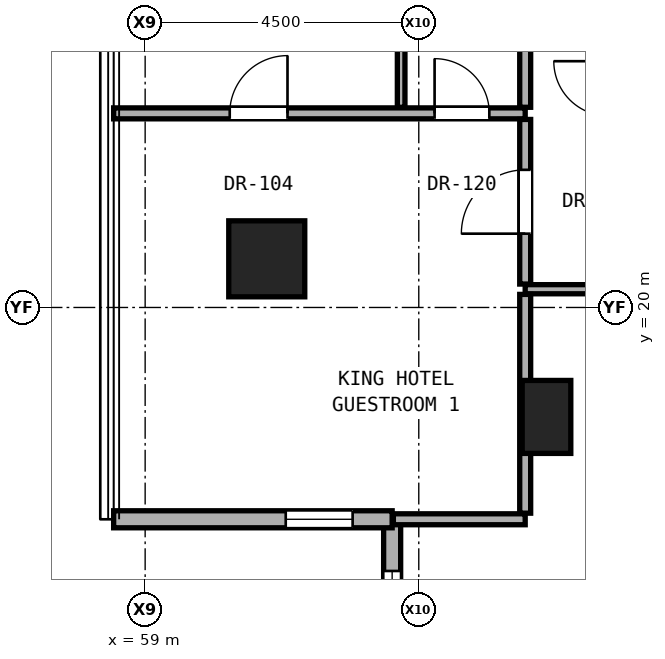
"""IFC4 building model, lengths in metres.
Left out: names, types, materials, properties, quantities, classifications, styles, units other than length and angle.
Written with IfcOpenShell. Run it as: python <this file> out.ifc"""

import sys

from ifc_helpers import new_model, si_unit, direction, frame, frame_2d, origin, origin_2d, place, context, subcontext, project, spatial, rectangle, hollow_rectangle, extrude, element, fill, save


model = new_model("IFC4")
c1 = context("Model", 3, precision=1e-05, world=origin(), true_north=direction((0.0, 1.0)))
c2 = subcontext(c1, "Body", "Model", "MODEL_VIEW")
j1 = project(units=[si_unit("LENGTHUNIT", "METRE"), si_unit("PLANEANGLEUNIT", "RADIAN")], contexts=[c1])
p1 = place(None, origin())
s1 = spatial("IfcSite", under=j1, at=p1, CompositionType="ELEMENT")
p2 = place(p1, origin())
s2 = spatial("IfcBuilding", under=s1, at=p2, CompositionType="ELEMENT")
p3 = place(p2, frame((0.0, 0.0, 25.7)))
s3 = spatial("IfcBuildingStorey", under=s2, at=p3, CompositionType="ELEMENT", Elevation=25.7)
p4 = place(p3, frame((61.0, 20.8, 0.0), z_axis=(0.0, 0.0, 1.0), x_axis=(1.0, 0.0, 0.0)))
e1 = element("IfcColumn", 1, at=p4, inside=s3, PredefinedType="COLUMN", context=c2, shape_type="SweptSolid", body=[
    extrude(hollow_rectangle(XDim=1.25, YDim=1.25, WallThickness=0.07, at=origin_2d()), origin(), (0.0, 0.0, 1.0), 3.3),
])
p5 = place(p3, frame((65.6, 18.2, 0.0), z_axis=(0.0, 0.0, 1.0), x_axis=(1.0, 0.0, 0.0)))
e2 = element("IfcColumn", 2, at=p5, inside=s3, PredefinedType="PILASTER", context=c2, shape_type="SweptSolid", body=[
    extrude(rectangle(XDim=0.8, YDim=1.2, at=origin_2d()), origin(), (0.0, 0.0, 1.0), 3.3),
])
p6 = place(p3, frame((63.062, 16.517, 0.0), z_axis=(0.0, 0.0, 1.0), x_axis=(0.0, -1.0, 0.0)))
e3 = element("IfcWall", 3, at=p6, inside=s3, PredefinedType="SOLIDWALL", context=c2, shape_type="SweptSolid", body=[
    extrude(rectangle(XDim=4.58, YDim=0.28, at=frame_2d((2.29, 0.0))), origin(), (0.0, 0.0, 1.0), 3.04),
])
p7 = place(p6, frame((0.85, 0.0, 0.79)))
e4 = element("IfcOpeningElement", 4, at=p7, cuts=e3, PredefinedType="OPENING", context=c2, shape_type="SweptSolid", body=[
    extrude(rectangle(XDim=1.8, YDim=2.1, at=frame_2d((0.9, 1.05))), frame((0.0, 0.15, 0.0), z_axis=(0.0, -1.0, 0.0), x_axis=(1.0, 0.0, 0.0)), (0.0, 0.0, 1.0), 0.3),
])
p8 = place(p3, frame((58.482, 16.517, 0.0), z_axis=(0.0, 0.0, 1.0), x_axis=(1.0, 0.0, 0.0)))
e5 = element("IfcWall", 5, at=p8, inside=s3, PredefinedType="SOLIDWALL", context=c2, shape_type="SweptSolid", body=[
    extrude(rectangle(XDim=4.58, YDim=0.28, at=frame_2d((2.29, 0.0))), origin(), (0.0, 0.0, 1.0), 3.04),
])
p9 = place(p8, frame((2.83, 0.0, 0.85)))
e6 = element("IfcOpeningElement", 6, at=p9, cuts=e5, PredefinedType="OPENING", context=c2, shape_type="SweptSolid", body=[
    extrude(rectangle(XDim=1.1, YDim=2.0, at=frame_2d((0.55, 1.0))), frame((0.0, 0.15, 0.0), z_axis=(0.0, -1.0, 0.0), x_axis=(1.0, 0.0, 0.0)), (0.0, 0.0, 1.0), 0.3),
])
p10 = place(p3, frame((63.082, 16.517, 0.0), z_axis=(0.0, 0.0, 1.0), x_axis=(1.0, 0.0, 0.0)))
e7 = element("IfcWall", 7, at=p10, inside=s3, PredefinedType="PARTITIONING", context=c2, shape_type="SweptSolid", body=[
    extrude(rectangle(XDim=2.168, YDim=0.18, at=frame_2d((1.084, 0.0))), origin(), (0.0, 0.0, 1.0), 3.06),
])
p11 = place(p3, frame((65.25, 20.3, 0.0), z_axis=(0.0, 0.0, 1.0), x_axis=(1.0, 0.0, 0.0)))
e8 = element("IfcWall", 8, at=p11, inside=s3, PredefinedType="PARTITIONING", context=c2, shape_type="SweptSolid", body=[
    extrude(rectangle(XDim=1.37, YDim=0.15, at=frame_2d((0.685, 0.0))), origin(), (0.0, 0.0, 1.0), 3.06),
])
p12 = place(p3, frame((58.482, 23.192, 0.0), z_axis=(0.0, 0.0, 1.0), x_axis=(1.0, 0.0, 0.0)))
e9 = element("IfcWall", 9, at=p12, inside=s3, PredefinedType="PARTITIONING", context=c2, shape_type="SweptSolid", body=[
    extrude(rectangle(XDim=6.768, YDim=0.18, at=frame_2d((3.384, 0.0))), origin(), (0.0, 0.0, 1.0), 2.196),
])
p13 = place(p12, frame((1.909, 0.0, 0.0)))
e10 = element("IfcOpeningElement", 10, at=p13, cuts=e9, PredefinedType="OPENING", context=c2, shape_type="SweptSolid", body=[
    extrude(rectangle(XDim=0.95, YDim=2.15, at=frame_2d((0.475, 1.075))), frame((0.0, 0.1, 0.0), z_axis=(0.0, -1.0, 0.0), x_axis=(1.0, 0.0, 0.0)), (0.0, 0.0, 1.0), 0.2),
])
p14 = place(p12, frame((5.278, 0.0, 0.0)))
e11 = element("IfcOpeningElement", 11, at=p14, cuts=e9, PredefinedType="OPENING", context=c2, shape_type="SweptSolid", body=[
    extrude(rectangle(XDim=0.9, YDim=2.1, at=frame_2d((0.45, 1.05))), frame((0.0, 0.1, 0.0), z_axis=(0.0, -1.0, 0.0), x_axis=(1.0, 0.0, 0.0)), (0.0, 0.0, 1.0), 0.2),
])
p15 = place(p3, frame((63.21, 23.292, 0.0), z_axis=(0.0, 0.0, 1.0), x_axis=(0.0, 1.0, 0.0)))
e12 = element("IfcWall", 12, at=p15, inside=s3, PredefinedType="PARTITIONING", context=c2, shape_type="SweptSolid", body=[
    extrude(rectangle(XDim=2.127, YDim=0.125, at=frame_2d((1.064, 0.0))), origin(), (0.0, 0.0, 1.0), 3.06),
])
p16 = place(p3, frame((65.25, 16.617, 0.0), z_axis=(0.0, 0.0, 1.0), x_axis=(0.0, 1.0, 0.0)))
e13 = element("IfcWall", 13, at=p16, inside=s3, PredefinedType="PARTITIONING", context=c2, shape_type="SweptSolid", body=[
    extrude(rectangle(XDim=3.598, YDim=0.18, at=frame_2d((1.799, 0.0))), origin(), (0.0, 0.0, 1.0), 2.436),
])
p17 = place(p3, frame((65.25, 20.385, 0.0), z_axis=(0.0, 0.0, 1.0), x_axis=(0.0, 1.0, 0.0)))
e14 = element("IfcWall", 14, at=p17, inside=s3, PredefinedType="PARTITIONING", context=c2, shape_type="SweptSolid", body=[
    extrude(rectangle(XDim=2.707, YDim=0.18, at=frame_2d((1.354, 0.0))), origin(), (0.0, 0.0, 1.0), 2.452),
])
p18 = place(p17, frame((0.829, 0.0, 0.0)))
e15 = element("IfcOpeningElement", 15, at=p18, cuts=e14, PredefinedType="OPENING", context=c2, shape_type="SweptSolid", body=[
    extrude(rectangle(XDim=1.05, YDim=2.2, at=frame_2d((0.525, 1.1))), frame((0.0, 0.1, 0.0), z_axis=(0.0, -1.0, 0.0), x_axis=(1.0, 0.0, 0.0)), (0.0, 0.0, 1.0), 0.2),
])
p19 = place(p3, frame((65.25, 23.292, 0.0), z_axis=(0.0, 0.0, 1.0), x_axis=(0.0, 1.0, 0.0)))
e16 = element("IfcWall", 16, at=p19, inside=s3, PredefinedType="PARTITIONING", context=c2, shape_type="SweptSolid", body=[
    extrude(rectangle(XDim=2.127, YDim=0.18, at=frame_2d((1.064, 0.0))), origin(), (0.0, 0.0, 1.0), 3.06),
])
p20 = place(p7, origin())
e17 = element("IfcWindow", 17, at=p20, inside=s3, PartitioningType="SINGLE_PANEL", PredefinedType="WINDOW", context=c2, shape_type="SweptSolid", body=[
    extrude(rectangle(XDim=1.8, YDim=2.1, at=frame_2d((0.9, 1.05))), frame((0.0, 0.03, 0.0), z_axis=(0.0, -1.0, 0.0), x_axis=(1.0, 0.0, 0.0)), (0.0, 0.0, 1.0), 0.06),
])
fill(e4, e17)
p21 = place(p9, origin())
e18 = element("IfcWindow", 18, at=p21, inside=s3, PartitioningType="SINGLE_PANEL", PredefinedType="WINDOW", context=c2, shape_type="SweptSolid", body=[
    extrude(rectangle(XDim=1.1, YDim=2.0, at=frame_2d((0.55, 1.0))), frame((0.0, 0.03, 0.0), z_axis=(0.0, -1.0, 0.0), x_axis=(1.0, 0.0, 0.0)), (0.0, 0.0, 1.0), 0.06),
])
fill(e6, e18)
p22 = place(p18, origin())
e19 = element("IfcDoor", 19, at=p22, inside=s3, OperationType="SINGLE_SWING_LEFT", PredefinedType="DOOR", context=c2, shape_type="SweptSolid", body=[
    extrude(rectangle(XDim=1.05, YDim=2.2, at=frame_2d((0.525, 1.1))), frame((0.0, 0.025, 0.0), z_axis=(0.0, -1.0, 0.0), x_axis=(1.0, 0.0, 0.0)), (0.0, 0.0, 1.0), 0.05),
])
fill(e15, e19)
p23 = place(p13, origin())
e20 = element("IfcDoor", 20, at=p23, inside=s3, OperationType="SINGLE_SWING_RIGHT", PredefinedType="DOOR", context=c2, shape_type="SweptSolid", body=[
    extrude(rectangle(XDim=0.95, YDim=2.15, at=frame_2d((0.475, 1.075))), frame((0.0, 0.025, 0.0), z_axis=(0.0, -1.0, 0.0), x_axis=(1.0, 0.0, 0.0)), (0.0, 0.0, 1.0), 0.05),
])
fill(e10, e20)
p24 = place(p14, origin())
e21 = element("IfcDoor", 21, at=p24, inside=s3, OperationType="SINGLE_SWING_LEFT", PredefinedType="DOOR", context=c2, shape_type="SweptSolid", body=[
    extrude(rectangle(XDim=0.9, YDim=2.1, at=frame_2d((0.45, 1.05))), frame((0.0, 0.025, 0.0), z_axis=(0.0, -1.0, 0.0), x_axis=(1.0, 0.0, 0.0)), (0.0, 0.0, 1.0), 0.05),
])
fill(e11, e21)
save(model, sys.argv[1])
